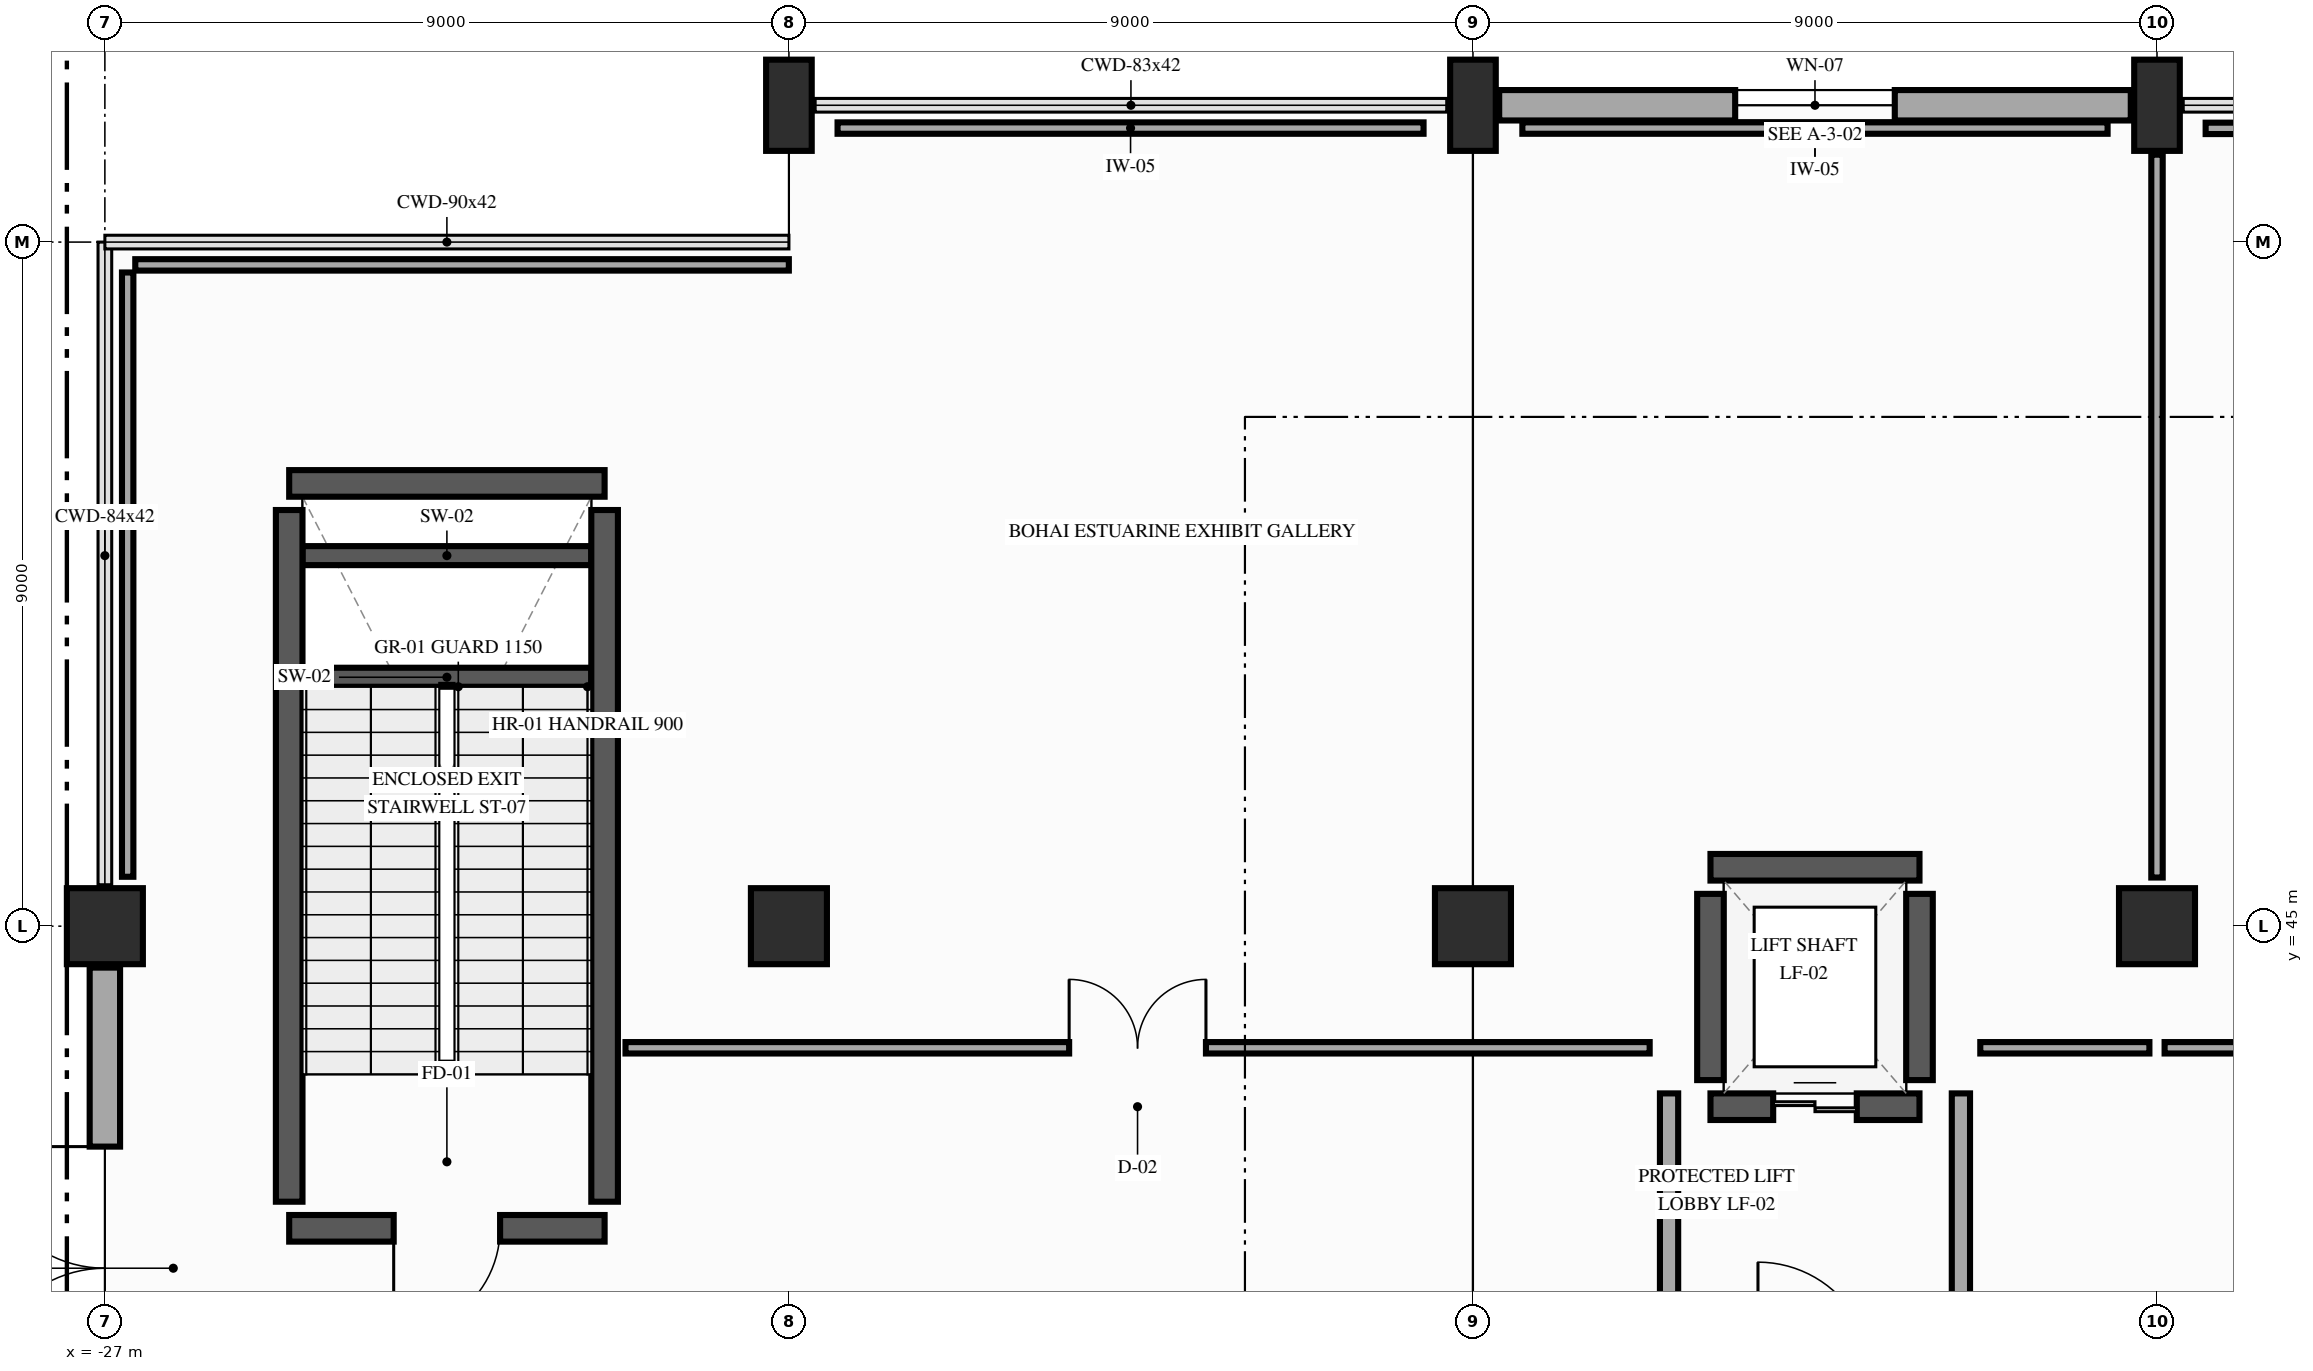
"""IFC4 building model, lengths in metres.
Left out: names, types, materials, properties, quantities, classifications, styles, units other than length and angle.
Written with IfcOpenShell. Run it as: python <this file> out.ifc"""

import sys

from ifc_helpers import new_model, si_unit, direction, frame, frame_2d, origin, origin_2d, place, context, subcontext, project, spatial, rectangle, extrude, element, fill, save


model = new_model("IFC4")
c1 = context("Model", 3, precision=1e-05, world=origin(), true_north=direction((0.0, 1.0)))
c2 = subcontext(c1, "Body", "Model", "MODEL_VIEW")
j1 = project(units=[si_unit("LENGTHUNIT", "METRE"), si_unit("PLANEANGLEUNIT", "RADIAN")], contexts=[c1])
p1 = place(None, origin())
s1 = spatial("IfcSite", under=j1, at=p1, CompositionType="ELEMENT")
p2 = place(p1, origin())
s2 = spatial("IfcBuilding", under=s1, at=p2, CompositionType="ELEMENT")
p3 = place(p2, origin())
s3 = spatial("IfcBuildingStorey", under=s2, at=p3, CompositionType="ELEMENT", Elevation=0.0)
for number, where, z_axis, x_axis in (
    (1, (-27.0, 45.0, 0.0), (0.0, 0.0, 1.0), (1.0, 0.0, 0.0)),
    (2, (-18.0, 45.0, 0.0), (0.0, 0.0, 1.0), (1.0, 0.0, 0.0)),
):
    element("IfcColumn", number, at=place(p3, frame(where, z_axis=z_axis, x_axis=x_axis)), inside=s3, PredefinedType="COLUMN", context=c2, shape_type="SweptSolid", body=[
        extrude(rectangle(XDim=1.0, YDim=1.0, at=origin_2d()), origin(), (0.0, 0.0, 1.0), 5.4),
    ])
p4 = place(p3, frame((-18.0, 55.8, 0.0), z_axis=(0.0, 0.0, 1.0), x_axis=(1.0, 0.0, 0.0)))
e3 = element("IfcColumn", 3, at=p4, inside=s3, PredefinedType="PILASTER", context=c2, shape_type="SweptSolid", body=[
    extrude(rectangle(XDim=0.6, YDim=1.2, at=origin_2d()), origin(), (0.0, 0.0, 1.0), 5.4),
])
p5 = place(p3, frame((-9.0, 45.0, 0.0), z_axis=(0.0, 0.0, 1.0), x_axis=(1.0, 0.0, 0.0)))
e4 = element("IfcColumn", 4, at=p5, inside=s3, PredefinedType="COLUMN", context=c2, shape_type="SweptSolid", body=[
    extrude(rectangle(XDim=1.0, YDim=1.0, at=origin_2d()), origin(), (0.0, 0.0, 1.0), 5.4),
])
p6 = place(p3, frame((-9.0, 55.8, 0.0), z_axis=(0.0, 0.0, 1.0), x_axis=(1.0, 0.0, 0.0)))
e5 = element("IfcColumn", 5, at=p6, inside=s3, PredefinedType="PILASTER", context=c2, shape_type="SweptSolid", body=[
    extrude(rectangle(XDim=0.6, YDim=1.2, at=origin_2d()), origin(), (0.0, 0.0, 1.0), 5.4),
])
p7 = place(p3, frame((0.0, 45.0, 0.0), z_axis=(0.0, 0.0, 1.0), x_axis=(1.0, 0.0, 0.0)))
e6 = element("IfcColumn", 6, at=p7, inside=s3, PredefinedType="COLUMN", context=c2, shape_type="SweptSolid", body=[
    extrude(rectangle(XDim=1.0, YDim=1.0, at=origin_2d()), origin(), (0.0, 0.0, 1.0), 5.4),
])
p8 = place(p3, frame((0.0, 55.8, 0.0), z_axis=(0.0, 0.0, 1.0), x_axis=(1.0, 0.0, 0.0)))
e7 = element("IfcColumn", 7, at=p8, inside=s3, PredefinedType="PILASTER", context=c2, shape_type="SweptSolid", body=[
    extrude(rectangle(XDim=0.6, YDim=1.2, at=origin_2d()), origin(), (0.0, 0.0, 1.0), 5.4),
])
p9 = place(p3, frame((-27.0, 36.545, 0.0), z_axis=(0.0, 0.0, 1.0), x_axis=(0.0, 1.0, 0.0)))
e8 = element("IfcWall", 8, at=p9, inside=s3, PredefinedType="SOLIDWALL", context=c2, shape_type="SweptSolid", body=[
    extrude(rectangle(XDim=7.91, YDim=0.4, at=frame_2d((3.955, 0.0))), origin(), (0.0, 0.0, 1.0), 4.205),
])
p10 = place(p9, frame((2.355, 0.0, 0.0)))
e9 = element("IfcOpeningElement", 9, at=p10, cuts=e8, PredefinedType="OPENING", context=c2, shape_type="SweptSolid", body=[
    extrude(rectangle(XDim=3.2, YDim=3.0, at=frame_2d((1.6, 1.5))), frame((0.0, 0.21, 0.0), z_axis=(0.0, -1.0, 0.0), x_axis=(1.0, 0.0, 0.0)), (0.0, 0.0, 1.0), 0.42),
])
p11 = place(p3, frame((-8.655, 55.8, 0.0), z_axis=(0.0, 0.0, 1.0), x_axis=(1.0, 0.0, 0.0)))
e10 = element("IfcWall", 10, at=p11, inside=s3, PredefinedType="SOLIDWALL", context=c2, shape_type="SweptSolid", body=[
    extrude(rectangle(XDim=8.31, YDim=0.4, at=frame_2d((4.155, 0.0))), origin(), (0.0, 0.0, 1.0), 4.205),
])
p12 = place(p11, frame((3.105, 0.0, 0.9)))
e11 = element("IfcOpeningElement", 11, at=p12, cuts=e10, PredefinedType="OPENING", context=c2, shape_type="SweptSolid", body=[
    extrude(rectangle(XDim=2.1, YDim=2.6, at=frame_2d((1.05, 1.3))), frame((0.0, 0.21, 0.0), z_axis=(0.0, -1.0, 0.0), x_axis=(1.0, 0.0, 0.0)), (0.0, 0.0, 1.0), 0.42),
])
for number, where, z_axis, x_axis in (
    (12, (-24.4, 48.275, 0.0), (0.0, 0.0, 1.0), (1.0, 0.0, 0.0)),
    (13, (-24.4, 49.875, 0.0), (0.0, 0.0, 1.0), (1.0, 0.0, 0.0)),
):
    element("IfcWall", number, at=place(p3, frame(where, z_axis=z_axis, x_axis=x_axis)), inside=s3, PredefinedType="SHEAR", context=c2, shape_type="SweptSolid", body=[
        extrude(rectangle(XDim=3.8, YDim=0.25, at=frame_2d((1.9, 0.0))), origin(), (0.0, 0.0, 1.0), 2.5),
    ])
p13 = place(p3, frame((-20.425, 41.025, 0.0), z_axis=(0.0, 0.0, 1.0), x_axis=(-1.0, 0.0, 0.0)))
e14 = element("IfcWall", 14, at=p13, inside=s3, PredefinedType="SHEAR", context=c2, shape_type="SweptSolid", body=[
    extrude(rectangle(XDim=4.15, YDim=0.35, at=frame_2d((2.075, 0.0))), origin(), (0.0, 0.0, 1.0), 5.12),
])
p14 = place(p13, frame((1.375, 0.0, 0.0)))
e15 = element("IfcOpeningElement", 15, at=p14, cuts=e14, PredefinedType="OPENING", context=c2, shape_type="SweptSolid", body=[
    extrude(rectangle(XDim=1.4, YDim=2.2, at=frame_2d((0.7, 1.1))), frame((0.0, 0.185, 0.0), z_axis=(0.0, -1.0, 0.0), x_axis=(1.0, 0.0, 0.0)), (0.0, 0.0, 1.0), 0.37),
])
p15 = place(p3, frame((-24.575, 50.825, 0.0), z_axis=(0.0, 0.0, 1.0), x_axis=(1.0, 0.0, 0.0)))
e16 = element("IfcWall", 16, at=p15, inside=s3, PredefinedType="SHEAR", context=c2, shape_type="SweptSolid", body=[
    extrude(rectangle(XDim=4.15, YDim=0.35, at=frame_2d((2.075, 0.0))), origin(), (0.0, 0.0, 1.0), 5.12),
])
for number, where, z_axis, x_axis in (
    (17, (-24.575, 41.375, 0.0), (0.0, 0.0, 1.0), (0.0, 1.0, 0.0)),
    (18, (-20.425, 41.375, 0.0), (0.0, 0.0, 1.0), (0.0, 1.0, 0.0)),
):
    element("IfcWall", number, at=place(p3, frame(where, z_axis=z_axis, x_axis=x_axis)), inside=s3, PredefinedType="SHEAR", context=c2, shape_type="SweptSolid", body=[
        extrude(rectangle(XDim=9.1, YDim=0.35, at=frame_2d((4.55, 0.0))), origin(), (0.0, 0.0, 1.0), 5.12),
    ])
p16 = place(p3, frame((-5.875, 42.625, 0.0), z_axis=(0.0, 0.0, 1.0), x_axis=(1.0, 0.0, 0.0)))
e19 = element("IfcWall", 19, at=p16, inside=s3, PredefinedType="SHEAR", context=c2, shape_type="SweptSolid", body=[
    extrude(rectangle(XDim=2.75, YDim=0.35, at=frame_2d((1.375, 0.0))), origin(), (0.0, 0.0, 1.0), 5.12),
])
p17 = place(p16, frame((0.825, 0.0, 0.0)))
e20 = element("IfcOpeningElement", 20, at=p17, cuts=e19, PredefinedType="OPENING", context=c2, shape_type="SweptSolid", body=[
    extrude(rectangle(XDim=1.1, YDim=2.2, at=frame_2d((0.55, 1.1))), frame((0.0, 0.185, 0.0), z_axis=(0.0, -1.0, 0.0), x_axis=(1.0, 0.0, 0.0)), (0.0, 0.0, 1.0), 0.37),
])
p18 = place(p3, frame((-3.125, 45.775, 0.0), z_axis=(0.0, 0.0, 1.0), x_axis=(-1.0, 0.0, 0.0)))
e21 = element("IfcWall", 21, at=p18, inside=s3, PredefinedType="SHEAR", context=c2, shape_type="SweptSolid", body=[
    extrude(rectangle(XDim=2.75, YDim=0.35, at=frame_2d((1.375, 0.0))), origin(), (0.0, 0.0, 1.0), 5.12),
])
for number, where, z_axis, x_axis in (
    (22, (-5.875, 42.975, 0.0), (0.0, 0.0, 1.0), (0.0, 1.0, 0.0)),
    (23, (-3.125, 42.975, 0.0), (0.0, 0.0, 1.0), (0.0, 1.0, 0.0)),
):
    element("IfcWall", number, at=place(p3, frame(where, z_axis=z_axis, x_axis=x_axis)), inside=s3, PredefinedType="SHEAR", context=c2, shape_type="SweptSolid", body=[
        extrude(rectangle(XDim=2.45, YDim=0.35, at=frame_2d((1.225, 0.0))), origin(), (0.0, 0.0, 1.0), 5.12),
    ])
for number, where, z_axis, x_axis in (
    (24, (-6.42, 39.2, 0.0), (0.0, 0.0, 1.0), (0.0, 1.0, 0.0)),
    (25, (-2.58, 39.2, 0.0), (0.0, 0.0, 1.0), (0.0, 1.0, 0.0)),
):
    element("IfcWall", number, at=place(p3, frame(where, z_axis=z_axis, x_axis=x_axis)), inside=s3, PredefinedType="PARTITIONING", context=c2, shape_type="SweptSolid", body=[
        extrude(rectangle(XDim=3.6, YDim=0.24, at=frame_2d((1.8, 0.0))), origin(), (0.0, 0.0, 1.0), 4.655),
    ])
p19 = place(p3, frame((-20.15, 43.4, 0.0), z_axis=(0.0, 0.0, 1.0), x_axis=(1.0, 0.0, 0.0)))
e26 = element("IfcWall", 26, at=p19, inside=s3, PredefinedType="PARTITIONING", context=c2, shape_type="SweptSolid", body=[
    extrude(rectangle(XDim=13.475, YDim=0.15, at=frame_2d((6.737, 0.0))), origin(), (0.0, 0.0, 1.0), 4.255),
])
p20 = place(p19, frame((5.837, 0.0, 0.0)))
e27 = element("IfcOpeningElement", 27, at=p20, cuts=e26, PredefinedType="OPENING", context=c2, shape_type="SweptSolid", body=[
    extrude(rectangle(XDim=1.8, YDim=2.3, at=frame_2d((0.9, 1.15))), frame((0.0, 0.085, 0.0), z_axis=(0.0, -1.0, 0.0), x_axis=(1.0, 0.0, 0.0)), (0.0, 0.0, 1.0), 0.17),
])
p21 = place(p3, frame((-2.325, 43.4, 0.0), z_axis=(0.0, 0.0, 1.0), x_axis=(1.0, 0.0, 0.0)))
e28 = element("IfcWall", 28, at=p21, inside=s3, PredefinedType="PARTITIONING", context=c2, shape_type="SweptSolid", body=[
    extrude(rectangle(XDim=2.225, YDim=0.15, at=frame_2d((1.112, 0.0))), origin(), (0.0, 0.0, 1.0), 4.255),
])
p22 = place(p3, frame((0.0, 45.64, 0.0), z_axis=(0.0, 0.0, 1.0), x_axis=(0.0, 1.0, 0.0)))
e29 = element("IfcWall", 29, at=p22, inside=s3, PredefinedType="PARTITIONING", context=c2, shape_type="SweptSolid", body=[
    extrude(rectangle(XDim=9.51, YDim=0.15, at=frame_2d((4.755, 0.0))), origin(), (0.0, 0.0, 1.0), 4.255),
])
p23 = place(p3, frame((-0.65, 55.5, 0.0), z_axis=(0.0, 0.0, 1.0), x_axis=(-1.0, 0.0, 0.0)))
e30 = element("IfcWall", 30, at=p23, inside=s3, PredefinedType="PARTITIONING", context=c2, shape_type="SweptSolid", body=[
    extrude(rectangle(XDim=7.7, YDim=0.15, at=frame_2d((3.85, 0.0))), origin(), (0.0, 0.0, 1.0), 4.205),
])
p24 = place(p3, frame((-9.65, 55.5, 0.0), z_axis=(0.0, 0.0, 1.0), x_axis=(-1.0, 0.0, 0.0)))
e31 = element("IfcWall", 31, at=p24, inside=s3, PredefinedType="PARTITIONING", context=c2, shape_type="SweptSolid", body=[
    extrude(rectangle(XDim=7.71, YDim=0.15, at=frame_2d((3.855, 0.0))), origin(), (0.0, 0.0, 1.0), 4.205),
])
p25 = place(p3, frame((-18.001, 53.7, 0.0), z_axis=(0.0, 0.0, 1.0), x_axis=(-1.0, 0.0, 0.0)))
e32 = element("IfcWall", 32, at=p25, inside=s3, PredefinedType="PARTITIONING", context=c2, shape_type="SweptSolid", body=[
    extrude(rectangle(XDim=8.599, YDim=0.15, at=frame_2d((4.3, 0.0))), origin(), (0.0, 0.0, 1.0), 4.255),
])
p26 = place(p3, frame((-26.7, 53.6, 0.0), z_axis=(0.0, 0.0, 1.0), x_axis=(0.0, -1.0, 0.0)))
e33 = element("IfcWall", 33, at=p26, inside=s3, PredefinedType="PARTITIONING", context=c2, shape_type="SweptSolid", body=[
    extrude(rectangle(XDim=7.95, YDim=0.15, at=frame_2d((3.975, 0.0))), origin(), (0.0, 0.0, 1.0), 5.05),
])
p27 = place(p3, frame((0.1, 43.4, 0.0), z_axis=(0.0, 0.0, 1.0), x_axis=(1.0, 0.0, 0.0)))
e34 = element("IfcWall", 34, at=p27, inside=s3, PredefinedType="PARTITIONING", context=c2, shape_type="SweptSolid", body=[
    extrude(rectangle(XDim=11.05, YDim=0.15, at=frame_2d((5.525, 0.0))), origin(), (0.0, 0.0, 1.0), 4.255),
])
p28 = place(p3, frame((8.35, 55.5, 0.0), z_axis=(0.0, 0.0, 1.0), x_axis=(-0.999999871661, -0.00050663367, 0.0)))
e35 = element("IfcWall", 35, at=p28, inside=s3, PredefinedType="PARTITIONING", context=c2, shape_type="SweptSolid", body=[
    extrude(rectangle(XDim=7.71, YDim=0.15, at=frame_2d((3.855, 0.0))), origin(), (0.0, 0.0, 1.0), 4.205),
])
p29 = place(p10, origin())
e36 = element("IfcDoor", 36, at=p29, inside=s3, OperationType="DOUBLE_DOOR_SINGLE_SWING", PredefinedType="DOOR", context=c2, shape_type="SweptSolid", body=[
    extrude(rectangle(XDim=3.2, YDim=3.0, at=frame_2d((1.6, 1.5))), frame((0.0, 0.025, 0.0), z_axis=(0.0, -1.0, 0.0), x_axis=(1.0, 0.0, 0.0)), (0.0, 0.0, 1.0), 0.05),
])
fill(e9, e36)
p30 = place(p12, origin())
e37 = element("IfcWindow", 37, at=p30, inside=s3, PartitioningType="SINGLE_PANEL", PredefinedType="WINDOW", context=c2, shape_type="SweptSolid", body=[
    extrude(rectangle(XDim=2.1, YDim=2.6, at=frame_2d((1.05, 1.3))), frame((0.0, 0.03, 0.0), z_axis=(0.0, -1.0, 0.0), x_axis=(1.0, 0.0, 0.0)), (0.0, 0.0, 1.0), 0.06),
])
fill(e11, e37)
p31 = place(p14, origin())
e38 = element("IfcDoor", 38, at=p31, inside=s3, OperationType="SINGLE_SWING_RIGHT", PredefinedType="DOOR", context=c2, shape_type="SweptSolid", body=[
    extrude(rectangle(XDim=1.4, YDim=2.2, at=frame_2d((0.7, 1.1))), frame((0.0, 0.025, 0.0), z_axis=(0.0, -1.0, 0.0), x_axis=(1.0, 0.0, 0.0)), (0.0, 0.0, 1.0), 0.05),
])
fill(e15, e38)
p32 = place(p17, origin())
e39 = element("IfcDoor", 39, at=p32, inside=s3, OperationType="DOUBLE_DOOR_SLIDING", PredefinedType="DOOR", context=c2, shape_type="SweptSolid", body=[
    extrude(rectangle(XDim=1.1, YDim=2.2, at=frame_2d((0.55, 1.1))), frame((0.0, 0.025, 0.0), z_axis=(0.0, -1.0, 0.0), x_axis=(1.0, 0.0, 0.0)), (0.0, 0.0, 1.0), 0.05),
])
fill(e20, e39)
p33 = place(p20, origin())
e40 = element("IfcDoor", 40, at=p33, inside=s3, OperationType="DOUBLE_DOOR_SINGLE_SWING", PredefinedType="DOOR", context=c2, shape_type="SweptSolid", body=[
    extrude(rectangle(XDim=1.8, YDim=2.3, at=frame_2d((0.9, 1.15))), frame((0.0, 0.025, 0.0), z_axis=(0.0, -1.0, 0.0), x_axis=(1.0, 0.0, 0.0)), (0.0, 0.0, 1.0), 0.05),
])
fill(e27, e40)
save(model, sys.argv[1])
